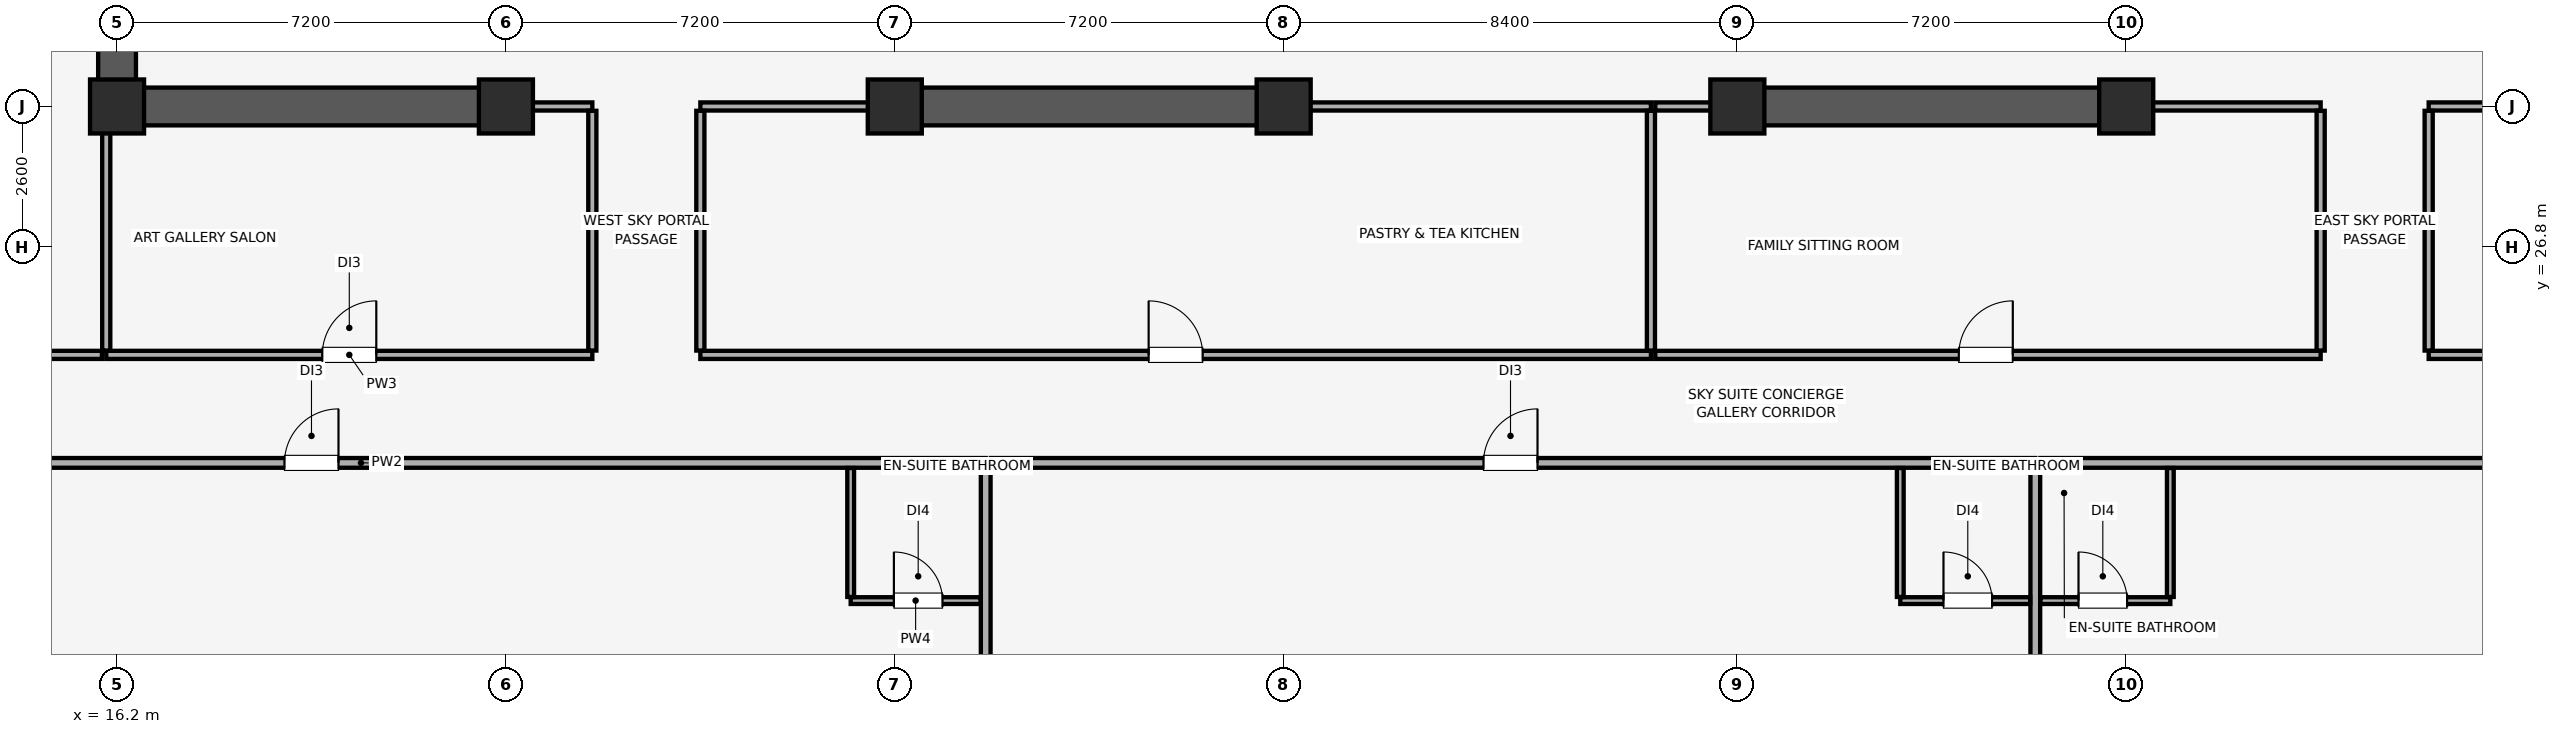
"""IFC4 building model, lengths in metres.
Left out: names, types, materials, properties, quantities, classifications, styles, units other than length and angle.
Written with IfcOpenShell. Run it as: python <this file> out.ifc"""

import sys

from ifc_helpers import new_model, si_unit, direction, frame, frame_2d, origin, origin_2d, place, context, subcontext, project, spatial, rectangle, extrude, element, fill, save


model = new_model("IFC4")
c1 = context("Model", 3, precision=1e-05, world=origin(), true_north=direction((0.0, 1.0)))
c2 = subcontext(c1, "Body", "Model", "MODEL_VIEW")
j1 = project(units=[si_unit("LENGTHUNIT", "METRE"), si_unit("PLANEANGLEUNIT", "RADIAN")], contexts=[c1])
p1 = place(None, origin())
s1 = spatial("IfcSite", under=j1, at=p1, CompositionType="ELEMENT")
p2 = place(p1, origin())
s2 = spatial("IfcBuilding", under=s1, at=p2, CompositionType="ELEMENT")
p3 = place(p2, frame((0.0, 0.0, 290.3)))
s3 = spatial("IfcBuildingStorey", under=s2, at=p3, CompositionType="ELEMENT", Elevation=290.3)
for number, where, z_axis, x_axis in (
    (1, (16.2, 29.4, 0.0), (0.0, 0.0, 1.0), (1.0, 0.0, 0.0)),
    (2, (23.4, 29.4, 0.0), (0.0, 0.0, 1.0), (1.0, 0.0, 0.0)),
    (3, (30.6, 29.4, 0.0), (0.0, 0.0, 1.0), (1.0, 0.0, 0.0)),
    (4, (37.8, 29.4, 0.0), (0.0, 0.0, 1.0), (1.0, 0.0, 0.0)),
    (5, (46.2, 29.4, 0.0), (0.0, 0.0, 1.0), (1.0, 0.0, 0.0)),
    (6, (53.4, 29.4, 0.0), (0.0, 0.0, 1.0), (1.0, 0.0, 0.0)),
):
    element("IfcColumn", number, at=place(p3, frame(where, z_axis=z_axis, x_axis=x_axis)), inside=s3, PredefinedType="COLUMN", context=c2, shape_type="SweptSolid", body=[
        extrude(rectangle(XDim=1.0, YDim=1.0, at=origin_2d()), origin(), (0.0, 0.0, 1.0), 4.02),
    ])
p4 = place(p3, frame((16.2, 29.4, 0.0), z_axis=(0.0, 0.0, 1.0), x_axis=(0.0, 1.0, 0.0)))
e7 = element("IfcWall", 7, at=p4, inside=s3, PredefinedType="SHEAR", context=c2, shape_type="SweptSolid", body=[
    extrude(rectangle(XDim=19.2, YDim=0.7, at=frame_2d((9.6, 0.0))), origin(), (0.0, 0.0, 1.0), 4.02),
])
p5 = place(p3, frame((16.555, 29.4, 0.0), z_axis=(0.0, 0.0, 1.0), x_axis=(1.0, 0.0, 0.0)))
e8 = element("IfcWall", 8, at=p5, inside=s3, PredefinedType="SHEAR", context=c2, shape_type="SweptSolid", body=[
    extrude(rectangle(XDim=7.045, YDim=0.7, at=frame_2d((3.522, 0.0))), origin(), (0.0, 0.0, 1.0), 4.02),
])
for number, where, z_axis, x_axis in (
    (9, (30.4, 29.4, 0.0), (0.0, 0.0, 1.0), (1.0, 0.0, 0.0)),
    (10, (46.0, 29.4, 0.0), (0.0, 0.0, 1.0), (1.0, 0.0, 0.0)),
):
    element("IfcWall", number, at=place(p3, frame(where, z_axis=z_axis, x_axis=x_axis)), inside=s3, PredefinedType="SHEAR", context=c2, shape_type="SweptSolid", body=[
        extrude(rectangle(XDim=7.6, YDim=0.7, at=frame_2d((3.8, 0.0))), origin(), (0.0, 0.0, 1.0), 4.02),
    ])
p6 = place(p3, frame((9.15, 22.8, 0.0), z_axis=(0.0, 0.0, 1.0), x_axis=(1.0, 0.0, 0.0)))
e11 = element("IfcWall", 11, at=p6, inside=s3, PredefinedType="PARTITIONING", context=c2, shape_type="SweptSolid", body=[
    extrude(rectangle(XDim=23.133, YDim=0.18, at=frame_2d((11.567, 0.0))), origin(), (0.0, 0.0, 1.0), 4.02),
])
p7 = place(p6, frame((10.15, 0.0, 0.0)))
e12 = element("IfcOpeningElement", 12, at=p7, cuts=e11, PredefinedType="OPENING", context=c2, shape_type="SweptSolid", body=[
    extrude(rectangle(XDim=1.0, YDim=2.15, at=frame_2d((0.5, 1.075))), frame((0.0, 0.1, 0.0), z_axis=(0.0, -1.0, 0.0), x_axis=(1.0, 0.0, 0.0)), (0.0, 0.0, 1.0), 0.2),
])
p8 = place(p3, frame((32.283, 7.15, 0.0), z_axis=(0.0, 0.0, 1.0), x_axis=(0.0, 1.0, 0.0)))
e13 = element("IfcWall", 13, at=p8, inside=s3, PredefinedType="PARTITIONING", context=c2, shape_type="SweptSolid", body=[
    extrude(rectangle(XDim=15.555, YDim=0.18, at=frame_2d((7.778, 0.0))), origin(), (0.0, 0.0, 1.0), 4.02),
])
p9 = place(p3, frame((29.783, 20.25, 0.0), z_axis=(0.0, 0.0, 1.0), x_axis=(1.0, 0.0, 0.0)))
e14 = element("IfcWall", 14, at=p9, inside=s3, PredefinedType="PARTITIONING", context=c2, shape_type="SweptSolid", body=[
    extrude(rectangle(XDim=2.405, YDim=0.125, at=frame_2d((1.203, 0.0))), origin(), (0.0, 0.0, 1.0), 4.02),
])
p10 = place(p9, frame((0.8, 0.0, 0.0)))
e15 = element("IfcOpeningElement", 15, at=p10, cuts=e14, PredefinedType="OPENING", context=c2, shape_type="SweptSolid", body=[
    extrude(rectangle(XDim=0.9, YDim=2.1, at=frame_2d((0.45, 1.05))), frame((0.0, 0.073, 0.0), z_axis=(0.0, -1.0, 0.0), x_axis=(1.0, 0.0, 0.0)), (0.0, 0.0, 1.0), 0.145),
])
p11 = place(p3, frame((29.783, 20.317, 0.0), z_axis=(0.0, 0.0, 1.0), x_axis=(0.0, 1.0, 0.0)))
e16 = element("IfcWall", 16, at=p11, inside=s3, PredefinedType="PARTITIONING", context=c2, shape_type="SweptSolid", body=[
    extrude(rectangle(XDim=2.388, YDim=0.125, at=frame_2d((1.194, 0.0))), origin(), (0.0, 0.0, 1.0), 4.02),
])
p12 = place(p3, frame((32.378, 22.8, 0.0), z_axis=(0.0, 0.0, 1.0), x_axis=(1.0, 0.0, 0.0)))
e17 = element("IfcWall", 17, at=p12, inside=s3, PredefinedType="PARTITIONING", context=c2, shape_type="SweptSolid", body=[
    extrude(rectangle(XDim=19.338, YDim=0.18, at=frame_2d((9.669, 0.0))), origin(), (0.0, 0.0, 1.0), 4.02),
])
p13 = place(p12, frame((9.122, 0.0, 0.0)))
e18 = element("IfcOpeningElement", 18, at=p13, cuts=e17, PredefinedType="OPENING", context=c2, shape_type="SweptSolid", body=[
    extrude(rectangle(XDim=1.0, YDim=2.15, at=frame_2d((0.5, 1.075))), frame((0.0, 0.1, 0.0), z_axis=(0.0, -1.0, 0.0), x_axis=(1.0, 0.0, 0.0)), (0.0, 0.0, 1.0), 0.2),
])
p14 = place(p3, frame((51.717, 7.15, 0.0), z_axis=(0.0, 0.0, 1.0), x_axis=(0.0, 1.0, 0.0)))
e19 = element("IfcWall", 19, at=p14, inside=s3, PredefinedType="PARTITIONING", context=c2, shape_type="SweptSolid", body=[
    extrude(rectangle(XDim=15.555, YDim=0.18, at=frame_2d((7.778, 0.0))), origin(), (0.0, 0.0, 1.0), 4.02),
])
p15 = place(p3, frame((49.217, 20.25, 0.0), z_axis=(0.0, 0.0, 1.0), x_axis=(1.0, 0.0, 0.0)))
e20 = element("IfcWall", 20, at=p15, inside=s3, PredefinedType="PARTITIONING", context=c2, shape_type="SweptSolid", body=[
    extrude(rectangle(XDim=2.405, YDim=0.125, at=frame_2d((1.202, 0.0))), origin(), (0.0, 0.0, 1.0), 4.02),
])
p16 = place(p15, frame((0.8, 0.0, 0.0)))
e21 = element("IfcOpeningElement", 21, at=p16, cuts=e20, PredefinedType="OPENING", context=c2, shape_type="SweptSolid", body=[
    extrude(rectangle(XDim=0.9, YDim=2.1, at=frame_2d((0.45, 1.05))), frame((0.0, 0.073, 0.0), z_axis=(0.0, -1.0, 0.0), x_axis=(1.0, 0.0, 0.0)), (0.0, 0.0, 1.0), 0.145),
])
p17 = place(p3, frame((49.217, 20.317, 0.0), z_axis=(0.0, 0.0, 1.0), x_axis=(0.0, 1.0, 0.0)))
e22 = element("IfcWall", 22, at=p17, inside=s3, PredefinedType="PARTITIONING", context=c2, shape_type="SweptSolid", body=[
    extrude(rectangle(XDim=2.388, YDim=0.125, at=frame_2d((1.194, 0.0))), origin(), (0.0, 0.0, 1.0), 4.02),
])
p18 = place(p3, frame((51.812, 22.8, 0.0), z_axis=(0.0, 0.0, 1.0), x_axis=(1.0, 0.0, 0.0)))
e23 = element("IfcWall", 23, at=p18, inside=s3, PredefinedType="PARTITIONING", context=c2, shape_type="SweptSolid", body=[
    extrude(rectangle(XDim=23.038, YDim=0.18, at=frame_2d((11.519, 0.0))), origin(), (0.0, 0.0, 1.0), 4.02),
])
p19 = place(p18, frame((11.888, 0.0, 0.0)))
e24 = element("IfcOpeningElement", 24, at=p19, cuts=e23, PredefinedType="OPENING", context=c2, shape_type="SweptSolid", body=[
    extrude(rectangle(XDim=1.0, YDim=2.15, at=frame_2d((0.5, 1.075))), frame((0.0, 0.1, 0.0), z_axis=(0.0, -1.0, 0.0), x_axis=(1.0, 0.0, 0.0)), (0.0, 0.0, 1.0), 0.2),
])
p20 = place(p3, frame((51.812, 20.25, 0.0), z_axis=(0.0, 0.0, 1.0), x_axis=(1.0, 0.0, 0.0)))
e25 = element("IfcWall", 25, at=p20, inside=s3, PredefinedType="PARTITIONING", context=c2, shape_type="SweptSolid", body=[
    extrude(rectangle(XDim=2.405, YDim=0.125, at=frame_2d((1.203, 0.0))), origin(), (0.0, 0.0, 1.0), 4.02),
])
p21 = place(p20, frame((0.705, 0.0, 0.0)))
e26 = element("IfcOpeningElement", 26, at=p21, cuts=e25, PredefinedType="OPENING", context=c2, shape_type="SweptSolid", body=[
    extrude(rectangle(XDim=0.9, YDim=2.1, at=frame_2d((0.45, 1.05))), frame((0.0, 0.073, 0.0), z_axis=(0.0, -1.0, 0.0), x_axis=(1.0, 0.0, 0.0)), (0.0, 0.0, 1.0), 0.145),
])
p22 = place(p3, frame((54.217, 20.317, 0.0), z_axis=(0.0, 0.0, 1.0), x_axis=(0.0, 1.0, 0.0)))
e27 = element("IfcWall", 27, at=p22, inside=s3, PredefinedType="PARTITIONING", context=c2, shape_type="SweptSolid", body=[
    extrude(rectangle(XDim=2.388, YDim=0.125, at=frame_2d((1.194, 0.0))), origin(), (0.0, 0.0, 1.0), 4.02),
])
p23 = place(p3, frame((16.0, 24.8, 0.0), z_axis=(0.0, 0.0, 1.0), x_axis=(1.0, 0.0, 0.0)))
e28 = element("IfcWall", 28, at=p23, inside=s3, PredefinedType="PARTITIONING", context=c2, shape_type="SweptSolid", body=[
    extrude(rectangle(XDim=9.0, YDim=0.15, at=frame_2d((4.5, 0.0))), origin(), (0.0, 0.0, 1.0), 4.02),
])
p24 = place(p23, frame((4.0, 0.0, 0.0)))
e29 = element("IfcOpeningElement", 29, at=p24, cuts=e28, PredefinedType="OPENING", context=c2, shape_type="SweptSolid", body=[
    extrude(rectangle(XDim=1.0, YDim=2.15, at=frame_2d((0.5, 1.075))), frame((0.0, 0.085, 0.0), z_axis=(0.0, -1.0, 0.0), x_axis=(1.0, 0.0, 0.0)), (0.0, 0.0, 1.0), 0.17),
])
p25 = place(p3, frame((23.61, 29.4, 0.0), z_axis=(0.0, 0.0, 1.0), x_axis=(1.0, 0.0, 0.0)))
e30 = element("IfcWall", 30, at=p25, inside=s3, PredefinedType="PARTITIONING", context=c2, shape_type="SweptSolid", body=[
    extrude(rectangle(XDim=1.39, YDim=0.15, at=frame_2d((0.695, 0.0))), origin(), (0.0, 0.0, 1.0), 2.92),
])
p26 = place(p3, frame((16.0, 24.88, 0.0), z_axis=(0.0, 0.0, 1.0), x_axis=(0.0, 1.0, 0.0)))
e31 = element("IfcWall", 31, at=p26, inside=s3, PredefinedType="PARTITIONING", context=c2, shape_type="SweptSolid", body=[
    extrude(rectangle(XDim=4.51, YDim=0.15, at=frame_2d((2.255, 0.0))), origin(), (0.0, 0.0, 1.0), 3.66),
])
p27 = place(p3, frame((25.0, 24.88, 0.0), z_axis=(0.0, 0.0, 1.0), x_axis=(0.0, 1.0, 0.0)))
e32 = element("IfcWall", 32, at=p27, inside=s3, PredefinedType="PARTITIONING", context=c2, shape_type="SweptSolid", body=[
    extrude(rectangle(XDim=4.44, YDim=0.15, at=frame_2d((2.22, 0.0))), origin(), (0.0, 0.0, 1.0), 4.02),
])
p28 = place(p3, frame((27.0, 24.8, 0.0), z_axis=(0.0, 0.0, 1.0), x_axis=(1.0, 0.0, 0.0)))
e33 = element("IfcWall", 33, at=p28, inside=s3, PredefinedType="PARTITIONING", context=c2, shape_type="SweptSolid", body=[
    extrude(rectangle(XDim=17.6, YDim=0.15, at=frame_2d((8.8, 0.0))), origin(), (0.0, 0.0, 1.0), 4.02),
])
p29 = place(p28, frame((8.3, 0.0, 0.0)))
e34 = element("IfcOpeningElement", 34, at=p29, cuts=e33, PredefinedType="OPENING", context=c2, shape_type="SweptSolid", body=[
    extrude(rectangle(XDim=1.0, YDim=2.15, at=frame_2d((0.5, 1.075))), frame((0.0, 0.085, 0.0), z_axis=(0.0, -1.0, 0.0), x_axis=(1.0, 0.0, 0.0)), (0.0, 0.0, 1.0), 0.17),
])
p30 = place(p3, frame((27.0, 29.4, 0.0), z_axis=(0.0, 0.0, 1.0), x_axis=(1.0, 0.0, 0.0)))
e35 = element("IfcWall", 35, at=p30, inside=s3, PredefinedType="PARTITIONING", context=c2, shape_type="SweptSolid", body=[
    extrude(rectangle(XDim=3.39, YDim=0.15, at=frame_2d((1.695, 0.0))), origin(), (0.0, 0.0, 1.0), 2.92),
])
p31 = place(p3, frame((38.01, 29.4, 0.0), z_axis=(0.0, 0.0, 1.0), x_axis=(1.0, 0.0, 0.0)))
e36 = element("IfcWall", 36, at=p31, inside=s3, PredefinedType="PARTITIONING", context=c2, shape_type="SweptSolid", body=[
    extrude(rectangle(XDim=6.59, YDim=0.15, at=frame_2d((3.295, 0.0))), origin(), (0.0, 0.0, 1.0), 2.92),
])
p32 = place(p3, frame((27.0, 24.88, 0.0), z_axis=(0.0, 0.0, 1.0), x_axis=(0.0, 1.0, 0.0)))
e37 = element("IfcWall", 37, at=p32, inside=s3, PredefinedType="PARTITIONING", context=c2, shape_type="SweptSolid", body=[
    extrude(rectangle(XDim=4.44, YDim=0.15, at=frame_2d((2.22, 0.0))), origin(), (0.0, 0.0, 1.0), 3.66),
])
p33 = place(p3, frame((44.6, 24.88, 0.0), z_axis=(0.0, 0.0, 1.0), x_axis=(0.0, 1.0, 0.0)))
e38 = element("IfcWall", 38, at=p33, inside=s3, PredefinedType="PARTITIONING", context=c2, shape_type="SweptSolid", body=[
    extrude(rectangle(XDim=4.44, YDim=0.15, at=frame_2d((2.22, 0.0))), origin(), (0.0, 0.0, 1.0), 4.02),
])
p34 = place(p3, frame((44.68, 24.8, 0.0), z_axis=(0.0, 0.0, 1.0), x_axis=(1.0, 0.0, 0.0)))
e39 = element("IfcWall", 39, at=p34, inside=s3, PredefinedType="PARTITIONING", context=c2, shape_type="SweptSolid", body=[
    extrude(rectangle(XDim=12.32, YDim=0.15, at=frame_2d((6.16, 0.0))), origin(), (0.0, 0.0, 1.0), 4.02),
])
p35 = place(p34, frame((5.62, 0.0, 0.0)))
e40 = element("IfcOpeningElement", 40, at=p35, cuts=e39, PredefinedType="OPENING", context=c2, shape_type="SweptSolid", body=[
    extrude(rectangle(XDim=1.0, YDim=2.15, at=frame_2d((0.5, 1.075))), frame((0.0, 0.085, 0.0), z_axis=(0.0, -1.0, 0.0), x_axis=(1.0, 0.0, 0.0)), (0.0, 0.0, 1.0), 0.17),
])
p36 = place(p3, frame((44.68, 29.4, 0.0), z_axis=(0.0, 0.0, 1.0), x_axis=(1.0, 0.0, 0.0)))
e41 = element("IfcWall", 41, at=p36, inside=s3, PredefinedType="PARTITIONING", context=c2, shape_type="SweptSolid", body=[
    extrude(rectangle(XDim=1.31, YDim=0.15, at=frame_2d((0.655, 0.0))), origin(), (0.0, 0.0, 1.0), 2.92),
])
p37 = place(p3, frame((53.61, 29.4, 0.0), z_axis=(0.0, 0.0, 1.0), x_axis=(1.0, 0.0, 0.0)))
e42 = element("IfcWall", 42, at=p37, inside=s3, PredefinedType="PARTITIONING", context=c2, shape_type="SweptSolid", body=[
    extrude(rectangle(XDim=3.39, YDim=0.15, at=frame_2d((1.695, 0.0))), origin(), (0.0, 0.0, 1.0), 2.92),
])
p38 = place(p3, frame((57.0, 24.88, 0.0), z_axis=(0.0, 0.0, 1.0), x_axis=(0.0, 1.0, 0.0)))
e43 = element("IfcWall", 43, at=p38, inside=s3, PredefinedType="PARTITIONING", context=c2, shape_type="SweptSolid", body=[
    extrude(rectangle(XDim=4.44, YDim=0.15, at=frame_2d((2.22, 0.0))), origin(), (0.0, 0.0, 1.0), 3.66),
])
p39 = place(p3, frame((59.0, 24.8, 0.0), z_axis=(0.0, 0.0, 1.0), x_axis=(1.0, 0.0, 0.0)))
e44 = element("IfcWall", 44, at=p39, inside=s3, PredefinedType="PARTITIONING", context=c2, shape_type="SweptSolid", body=[
    extrude(rectangle(XDim=9.0, YDim=0.15, at=frame_2d((4.5, 0.0))), origin(), (0.0, 0.0, 1.0), 4.02),
])
p40 = place(p39, frame((4.0, 0.0, 0.0)))
e45 = element("IfcOpeningElement", 45, at=p40, cuts=e44, PredefinedType="OPENING", context=c2, shape_type="SweptSolid", body=[
    extrude(rectangle(XDim=1.0, YDim=2.15, at=frame_2d((0.5, 1.075))), frame((0.0, 0.085, 0.0), z_axis=(0.0, -1.0, 0.0), x_axis=(1.0, 0.0, 0.0)), (0.0, 0.0, 1.0), 0.17),
])
p41 = place(p3, frame((59.0, 29.4, 0.0), z_axis=(0.0, 0.0, 1.0), x_axis=(1.0, 0.0, 0.0)))
e46 = element("IfcWall", 46, at=p41, inside=s3, PredefinedType="PARTITIONING", context=c2, shape_type="SweptSolid", body=[
    extrude(rectangle(XDim=1.39, YDim=0.15, at=frame_2d((0.695, 0.0))), origin(), (0.0, 0.0, 1.0), 2.92),
])
p42 = place(p3, frame((59.0, 24.88, 0.0), z_axis=(0.0, 0.0, 1.0), x_axis=(0.0, 1.0, 0.0)))
e47 = element("IfcWall", 47, at=p42, inside=s3, PredefinedType="PARTITIONING", context=c2, shape_type="SweptSolid", body=[
    extrude(rectangle(XDim=4.44, YDim=0.15, at=frame_2d((2.22, 0.0))), origin(), (0.0, 0.0, 1.0), 4.02),
])
p43 = place(p3, frame((9.15, 24.8, 0.0), z_axis=(0.0, 0.0, 1.0), x_axis=(1.0, 0.0, 0.0)))
e48 = element("IfcWall", 48, at=p43, inside=s3, PredefinedType="PARTITIONING", context=c2, shape_type="SweptSolid", body=[
    extrude(rectangle(XDim=6.77, YDim=0.15, at=frame_2d((3.385, 0.0))), origin(), (0.0, 0.0, 1.0), 4.02),
])
p44 = place(p43, frame((4.78, 0.0, 0.0)))
e49 = element("IfcOpeningElement", 49, at=p44, cuts=e48, PredefinedType="OPENING", context=c2, shape_type="SweptSolid", body=[
    extrude(rectangle(XDim=1.0, YDim=2.15, at=frame_2d((0.5, 1.075))), frame((0.0, 0.085, 0.0), z_axis=(0.0, -1.0, 0.0), x_axis=(1.0, 0.0, 0.0)), (0.0, 0.0, 1.0), 0.17),
])
p45 = place(p7, origin())
e50 = element("IfcDoor", 50, at=p45, inside=s3, OperationType="SINGLE_SWING_RIGHT", PredefinedType="DOOR", context=c2, shape_type="SweptSolid", body=[
    extrude(rectangle(XDim=1.0, YDim=2.15, at=frame_2d((0.5, 1.075))), frame((0.0, 0.025, 0.0), z_axis=(0.0, -1.0, 0.0), x_axis=(1.0, 0.0, 0.0)), (0.0, 0.0, 1.0), 0.05),
])
fill(e12, e50)
p46 = place(p10, origin())
e51 = element("IfcDoor", 51, at=p46, inside=s3, OperationType="SINGLE_SWING_LEFT", PredefinedType="DOOR", context=c2, shape_type="SweptSolid", body=[
    extrude(rectangle(XDim=0.9, YDim=2.1, at=frame_2d((0.45, 1.05))), frame((0.0, 0.025, 0.0), z_axis=(0.0, -1.0, 0.0), x_axis=(1.0, 0.0, 0.0)), (0.0, 0.0, 1.0), 0.05),
])
fill(e15, e51)
p47 = place(p13, origin())
e52 = element("IfcDoor", 52, at=p47, inside=s3, OperationType="SINGLE_SWING_RIGHT", PredefinedType="DOOR", context=c2, shape_type="SweptSolid", body=[
    extrude(rectangle(XDim=1.0, YDim=2.15, at=frame_2d((0.5, 1.075))), frame((0.0, 0.025, 0.0), z_axis=(0.0, -1.0, 0.0), x_axis=(1.0, 0.0, 0.0)), (0.0, 0.0, 1.0), 0.05),
])
fill(e18, e52)
p48 = place(p16, origin())
e53 = element("IfcDoor", 53, at=p48, inside=s3, OperationType="SINGLE_SWING_LEFT", PredefinedType="DOOR", context=c2, shape_type="SweptSolid", body=[
    extrude(rectangle(XDim=0.9, YDim=2.1, at=frame_2d((0.45, 1.05))), frame((0.0, 0.025, 0.0), z_axis=(0.0, -1.0, 0.0), x_axis=(1.0, 0.0, 0.0)), (0.0, 0.0, 1.0), 0.05),
])
fill(e21, e53)
p49 = place(p21, origin())
e54 = element("IfcDoor", 54, at=p49, inside=s3, OperationType="SINGLE_SWING_LEFT", PredefinedType="DOOR", context=c2, shape_type="SweptSolid", body=[
    extrude(rectangle(XDim=0.9, YDim=2.1, at=frame_2d((0.45, 1.05))), frame((0.0, 0.025, 0.0), z_axis=(0.0, -1.0, 0.0), x_axis=(1.0, 0.0, 0.0)), (0.0, 0.0, 1.0), 0.05),
])
fill(e26, e54)
p50 = place(p24, origin())
e55 = element("IfcDoor", 55, at=p50, inside=s3, OperationType="SINGLE_SWING_RIGHT", PredefinedType="DOOR", context=c2, shape_type="SweptSolid", body=[
    extrude(rectangle(XDim=1.0, YDim=2.15, at=frame_2d((0.5, 1.075))), frame((0.0, 0.025, 0.0), z_axis=(0.0, -1.0, 0.0), x_axis=(1.0, 0.0, 0.0)), (0.0, 0.0, 1.0), 0.05),
])
fill(e29, e55)
p51 = place(p29, origin())
e56 = element("IfcDoor", 56, at=p51, inside=s3, OperationType="SINGLE_SWING_LEFT", PredefinedType="DOOR", context=c2, shape_type="SweptSolid", body=[
    extrude(rectangle(XDim=1.0, YDim=2.15, at=frame_2d((0.5, 1.075))), frame((0.0, 0.025, 0.0), z_axis=(0.0, -1.0, 0.0), x_axis=(1.0, 0.0, 0.0)), (0.0, 0.0, 1.0), 0.05),
])
fill(e34, e56)
p52 = place(p35, origin())
e57 = element("IfcDoor", 57, at=p52, inside=s3, OperationType="SINGLE_SWING_RIGHT", PredefinedType="DOOR", context=c2, shape_type="SweptSolid", body=[
    extrude(rectangle(XDim=1.0, YDim=2.15, at=frame_2d((0.5, 1.075))), frame((0.0, 0.025, 0.0), z_axis=(0.0, -1.0, 0.0), x_axis=(1.0, 0.0, 0.0)), (0.0, 0.0, 1.0), 0.05),
])
fill(e40, e57)
save(model, sys.argv[1])
